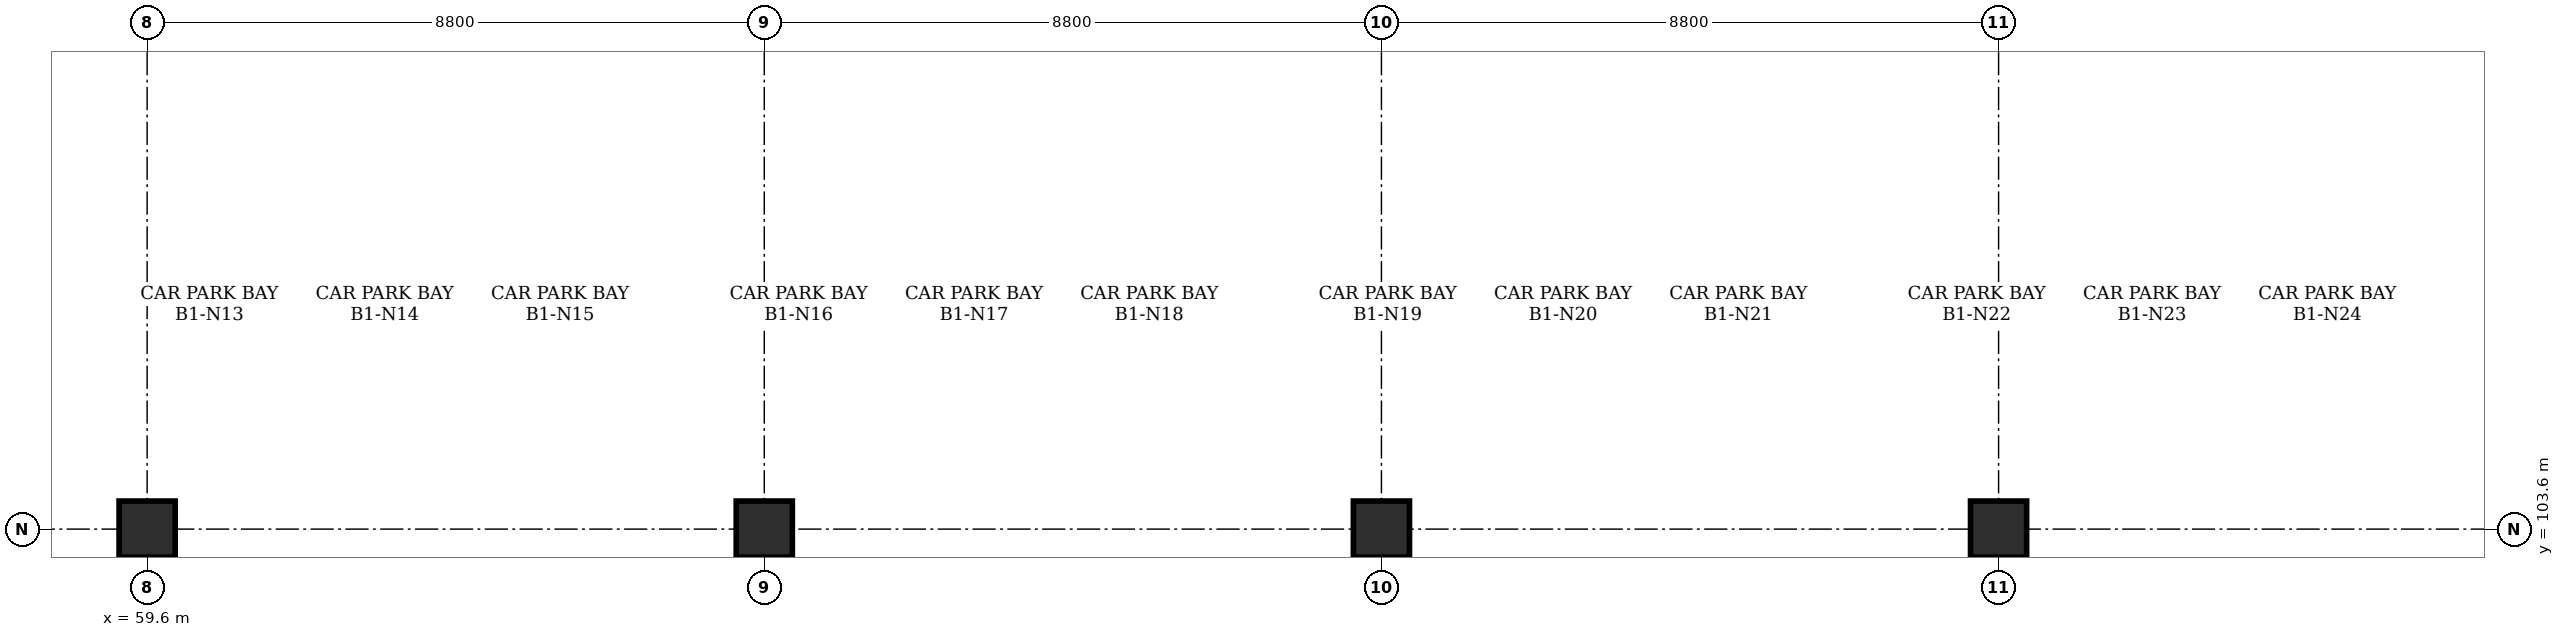
"""IFC4 building model, lengths in metres.
Left out: names, types, materials, properties, quantities, classifications, styles, units other than length and angle.
Written with IfcOpenShell. Run it as: python <this file> out.ifc"""

import sys

from ifc_helpers import new_model, si_unit, direction, frame, origin, origin_2d, place, context, subcontext, project, spatial, rectangle, extrude, element, save


model = new_model("IFC4")
c1 = context("Model", 3, precision=1e-05, world=origin(), true_north=direction((0.0, 1.0)))
c2 = subcontext(c1, "Body", "Model", "MODEL_VIEW")
j1 = project(units=[si_unit("LENGTHUNIT", "METRE"), si_unit("PLANEANGLEUNIT", "RADIAN")], contexts=[c1])
p1 = place(None, origin())
s1 = spatial("IfcSite", under=j1, at=p1, CompositionType="ELEMENT")
p2 = place(p1, origin())
s2 = spatial("IfcBuilding", under=s1, at=p2, CompositionType="ELEMENT")
p3 = place(p2, frame((0.0, 0.0, -4.8)))
s3 = spatial("IfcBuildingStorey", under=s2, at=p3, CompositionType="ELEMENT", Elevation=-4.8)
for number, where, z_axis, x_axis in (
    (1, (59.6, 103.6, 0.0), (0.0, 0.0, 1.0), (1.0, 0.0, 0.0)),
    (2, (68.4, 103.6, 0.0), (0.0, 0.0, 1.0), (1.0, 0.0, 0.0)),
    (3, (77.2, 103.6, 0.0), (0.0, 0.0, 1.0), (1.0, 0.0, 0.0)),
    (4, (86.0, 103.6, 0.0), (0.0, 0.0, 1.0), (1.0, 0.0, 0.0)),
):
    element("IfcColumn", number, at=place(p3, frame(where, z_axis=z_axis, x_axis=x_axis)), inside=s3, PredefinedType="COLUMN", context=c2, shape_type="SweptSolid", body=[
        extrude(rectangle(XDim=0.8, YDim=0.8, at=origin_2d()), origin(), (0.0, 0.0, 1.0), 4.395),
    ])
save(model, sys.argv[1])
